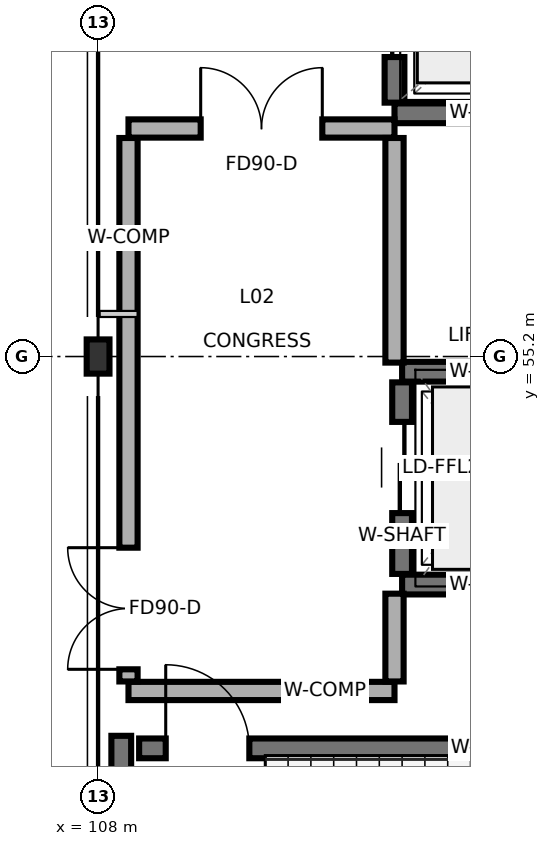
"""IFC4 building model, lengths in metres.
Left out: names, types, materials, properties, quantities, classifications, styles, units other than length and angle.
Written with IfcOpenShell. Run it as: python <this file> out.ifc"""

import sys

from ifc_helpers import new_model, si_unit, direction, frame, frame_2d, origin, origin_2d, place, context, subcontext, project, spatial, rectangle, i_section, extrude, element, fill, save


model = new_model("IFC4")
c1 = context("Model", 3, precision=1e-05, world=origin(), true_north=direction((0.0, 1.0)))
c2 = subcontext(c1, "Body", "Model", "MODEL_VIEW")
j1 = project(units=[si_unit("LENGTHUNIT", "METRE"), si_unit("PLANEANGLEUNIT", "RADIAN")], contexts=[c1])
p1 = place(None, origin())
s1 = spatial("IfcSite", under=j1, at=p1, CompositionType="ELEMENT")
p2 = place(p1, origin())
s2 = spatial("IfcBuilding", under=s1, at=p2, CompositionType="ELEMENT")
p3 = place(p2, frame((0.0, 0.0, 5.4)))
s3 = spatial("IfcBuildingStorey", under=s2, at=p3, CompositionType="ELEMENT", Elevation=5.4)
p4 = place(p3, frame((108.0, 55.2, 0.0), z_axis=(0.0, 0.0, 1.0), x_axis=(1.0, 0.0, 0.0)))
e1 = element("IfcColumn", 1, at=p4, inside=s3, PredefinedType="COLUMN", context=c2, shape_type="SweptSolid", body=[
    extrude(i_section(OverallWidth=0.3, OverallDepth=0.45, WebThickness=0.014, FlangeThickness=0.026, FilletRadius=0.027, at=origin_2d()), origin(), (0.0, 0.0, 1.0), 4.5),
])
p5 = place(p3, frame((108.305, 45.94, 0.0), z_axis=(0.0, 0.0, 1.0), x_axis=(0.0, 1.0, 0.0)))
e2 = element("IfcWall", 2, at=p5, inside=s3, PredefinedType="SHEAR", context=c2, shape_type="SweptSolid", body=[
    extrude(rectangle(XDim=4.27, YDim=0.26, at=frame_2d((2.135, 0.0))), origin(), (0.0, 0.0, 1.0), 4.24),
])
p6 = place(p3, frame((108.54, 50.045, 0.0), z_axis=(0.0, 0.0, 1.0), x_axis=(1.0, 0.0, 0.0)))
e3 = element("IfcWall", 3, at=p6, inside=s3, PredefinedType="SHEAR", context=c2, shape_type="SweptSolid", body=[
    extrude(rectangle(XDim=8.52, YDim=0.26, at=frame_2d((4.26, 0.0))), origin(), (0.0, 0.0, 1.0), 4.24),
])
p7 = place(p6, frame((0.35, 0.0, 0.0)))
e4 = element("IfcOpeningElement", 4, at=p7, cuts=e3, PredefinedType="OPENING", context=c2, shape_type="SweptSolid", body=[
    extrude(rectangle(XDim=1.1, YDim=2.2, at=frame_2d((0.55, 1.1))), frame((0.0, 0.14, 0.0), z_axis=(0.0, -1.0, 0.0), x_axis=(1.0, 0.0, 0.0)), (0.0, 0.0, 1.0), 0.28),
])
for number, where, z_axis, x_axis in (
    (5, (112.0, 52.2, 0.0), (0.0, 0.0, 1.0), (1.0, 0.0, 0.0)),
    (6, (112.0, 55.0, 0.0), (0.0, 0.0, 1.0), (1.0, 0.0, 0.0)),
):
    element("IfcWall", number, at=place(p3, frame(where, z_axis=z_axis, x_axis=x_axis)), inside=s3, PredefinedType="SHEAR", context=c2, shape_type="SweptSolid", body=[
        extrude(rectangle(XDim=2.4, YDim=0.26, at=frame_2d((1.2, 0.0))), origin(), (0.0, 0.0, 1.0), 3.685),
    ])
p8 = place(p3, frame((112.0, 52.34, 0.0), z_axis=(0.0, 0.0, 1.0), x_axis=(0.0, 1.0, 0.0)))
e7 = element("IfcWall", 7, at=p8, inside=s3, PredefinedType="SHEAR", context=c2, shape_type="SweptSolid", body=[
    extrude(rectangle(XDim=2.52, YDim=0.26, at=frame_2d((1.26, 0.0))), origin(), (0.0, 0.0, 1.0), 3.685),
])
p9 = place(p8, frame((0.8, 0.0, 0.0)))
e8 = element("IfcOpeningElement", 8, at=p9, cuts=e7, PredefinedType="OPENING", context=c2, shape_type="SweptSolid", body=[
    extrude(rectangle(XDim=1.2, YDim=2.2, at=frame_2d((0.6, 1.1))), frame((0.0, 0.14, 0.0), z_axis=(0.0, -1.0, 0.0), x_axis=(1.0, 0.0, 0.0)), (0.0, 0.0, 1.0), 0.28),
])
p10 = place(p3, frame((111.9, 58.4, 0.0), z_axis=(0.0, 0.0, 1.0), x_axis=(1.0, 0.0, 0.0)))
e9 = element("IfcWall", 9, at=p10, inside=s3, PredefinedType="SHEAR", context=c2, shape_type="SweptSolid", body=[
    extrude(rectangle(XDim=2.6, YDim=0.26, at=frame_2d((1.3, 0.0))), origin(), (0.0, 0.0, 1.0), 4.24),
])
p11 = place(p3, frame((111.9, 58.54, 0.0), z_axis=(0.0, 0.0, 1.0), x_axis=(0.0, 1.0, 0.0)))
e10 = element("IfcWall", 10, at=p11, inside=s3, PredefinedType="SHEAR", context=c2, shape_type="SweptSolid", body=[
    extrude(rectangle(XDim=2.12, YDim=0.26, at=frame_2d((1.06, 0.0))), origin(), (0.0, 0.0, 1.0), 4.24),
])
p12 = place(p11, frame((0.6, 0.0, 0.0)))
e11 = element("IfcOpeningElement", 11, at=p12, cuts=e10, PredefinedType="OPENING", context=c2, shape_type="SweptSolid", body=[
    extrude(rectangle(XDim=1.2, YDim=2.2, at=frame_2d((0.6, 1.1))), frame((0.0, 0.14, 0.0), z_axis=(0.0, -1.0, 0.0), x_axis=(1.0, 0.0, 0.0)), (0.0, 0.0, 1.0), 0.28),
])
p13 = place(p3, frame((108.4, 50.8, 0.0), z_axis=(0.0, 0.0, 1.0), x_axis=(1.0, 0.0, 0.0)))
e12 = element("IfcWall", 12, at=p13, inside=s3, PredefinedType="SOLIDWALL", context=c2, shape_type="SweptSolid", body=[
    extrude(rectangle(XDim=3.5, YDim=0.24, at=frame_2d((1.75, 0.0))), origin(), (0.0, 0.0, 1.0), 4.24),
])
p14 = place(p3, frame((108.4, 50.925, 0.0), z_axis=(0.0, 0.0, 1.0), x_axis=(0.0, 1.0, 0.0)))
e13 = element("IfcWall", 13, at=p14, inside=s3, PredefinedType="SOLIDWALL", context=c2, shape_type="SweptSolid", body=[
    extrude(rectangle(XDim=7.15, YDim=0.24, at=frame_2d((3.575, 0.0))), origin(), (0.0, 0.0, 1.0), 3.685),
])
p15 = place(p14, frame((0.16, 0.0, 0.0)))
e14 = element("IfcOpeningElement", 14, at=p15, cuts=e13, PredefinedType="OPENING", context=c2, shape_type="SweptSolid", body=[
    extrude(rectangle(XDim=1.6, YDim=2.2, at=frame_2d((0.8, 1.1))), frame((0.0, 0.13, 0.0), z_axis=(0.0, -1.0, 0.0), x_axis=(1.0, 0.0, 0.0)), (0.0, 0.0, 1.0), 0.26),
])
p16 = place(p3, frame((108.4, 58.2, 0.0), z_axis=(0.0, 0.0, 1.0), x_axis=(1.0, 0.0, 0.0)))
e15 = element("IfcWall", 15, at=p16, inside=s3, PredefinedType="SOLIDWALL", context=c2, shape_type="SweptSolid", body=[
    extrude(rectangle(XDim=3.5, YDim=0.24, at=frame_2d((1.75, 0.0))), origin(), (0.0, 0.0, 1.0), 4.24),
])
p17 = place(p16, frame((0.95, 0.0, 0.0)))
e16 = element("IfcOpeningElement", 16, at=p17, cuts=e15, PredefinedType="OPENING", context=c2, shape_type="SweptSolid", body=[
    extrude(rectangle(XDim=1.6, YDim=2.2, at=frame_2d((0.8, 1.1))), frame((0.0, 0.13, 0.0), z_axis=(0.0, -1.0, 0.0), x_axis=(1.0, 0.0, 0.0)), (0.0, 0.0, 1.0), 0.26),
])
p18 = place(p3, frame((111.9, 50.925, 0.0), z_axis=(0.0, 0.0, 1.0), x_axis=(0.0, 1.0, 0.0)))
e17 = element("IfcWall", 17, at=p18, inside=s3, PredefinedType="SOLIDWALL", context=c2, shape_type="SweptSolid", body=[
    extrude(rectangle(XDim=1.155, YDim=0.24, at=frame_2d((0.578, 0.0))), origin(), (0.0, 0.0, 1.0), 4.24),
])
p19 = place(p3, frame((111.9, 55.12, 0.0), z_axis=(0.0, 0.0, 1.0), x_axis=(0.0, 1.0, 0.0)))
e18 = element("IfcWall", 18, at=p19, inside=s3, PredefinedType="SOLIDWALL", context=c2, shape_type="SweptSolid", body=[
    extrude(rectangle(XDim=2.955, YDim=0.24, at=frame_2d((1.478, 0.0))), origin(), (0.0, 0.0, 1.0), 3.685),
])
p20 = place(p7, origin())
e19 = element("IfcDoor", 19, at=p20, inside=s3, OperationType="SINGLE_SWING_LEFT", PredefinedType="DOOR", context=c2, shape_type="SweptSolid", body=[
    extrude(rectangle(XDim=1.1, YDim=2.2, at=frame_2d((0.55, 1.1))), frame((0.0, 0.025, 0.0), z_axis=(0.0, -1.0, 0.0), x_axis=(1.0, 0.0, 0.0)), (0.0, 0.0, 1.0), 0.05),
])
fill(e4, e19)
p21 = place(p9, origin())
e20 = element("IfcDoor", 20, at=p21, inside=s3, OperationType="SLIDING_TO_LEFT", PredefinedType="DOOR", context=c2, shape_type="SweptSolid", body=[
    extrude(rectangle(XDim=1.2, YDim=2.2, at=frame_2d((0.6, 1.1))), frame((0.0, 0.025, 0.0), z_axis=(0.0, -1.0, 0.0), x_axis=(1.0, 0.0, 0.0)), (0.0, 0.0, 1.0), 0.05),
])
fill(e8, e20)
p22 = place(p12, origin())
e21 = element("IfcDoor", 21, at=p22, inside=s3, OperationType="SLIDING_TO_RIGHT", PredefinedType="DOOR", context=c2, shape_type="SweptSolid", body=[
    extrude(rectangle(XDim=1.2, YDim=2.2, at=frame_2d((0.6, 1.1))), frame((0.0, 0.025, 0.0), z_axis=(0.0, -1.0, 0.0), x_axis=(1.0, 0.0, 0.0)), (0.0, 0.0, 1.0), 0.05),
])
fill(e11, e21)
p23 = place(p15, origin())
e22 = element("IfcDoor", 22, at=p23, inside=s3, OperationType="DOUBLE_DOOR_SINGLE_SWING", PredefinedType="DOOR", context=c2, shape_type="SweptSolid", body=[
    extrude(rectangle(XDim=1.6, YDim=2.2, at=frame_2d((0.8, 1.1))), frame((0.0, 0.025, 0.0), z_axis=(0.0, -1.0, 0.0), x_axis=(1.0, 0.0, 0.0)), (0.0, 0.0, 1.0), 0.05),
])
fill(e14, e22)
p24 = place(p17, origin())
e23 = element("IfcDoor", 23, at=p24, inside=s3, OperationType="DOUBLE_DOOR_SINGLE_SWING", PredefinedType="DOOR", context=c2, shape_type="SweptSolid", body=[
    extrude(rectangle(XDim=1.6, YDim=2.2, at=frame_2d((0.8, 1.1))), frame((0.0, 0.025, 0.0), z_axis=(0.0, -1.0, 0.0), x_axis=(1.0, 0.0, 0.0)), (0.0, 0.0, 1.0), 0.05),
])
fill(e16, e23)
save(model, sys.argv[1])
